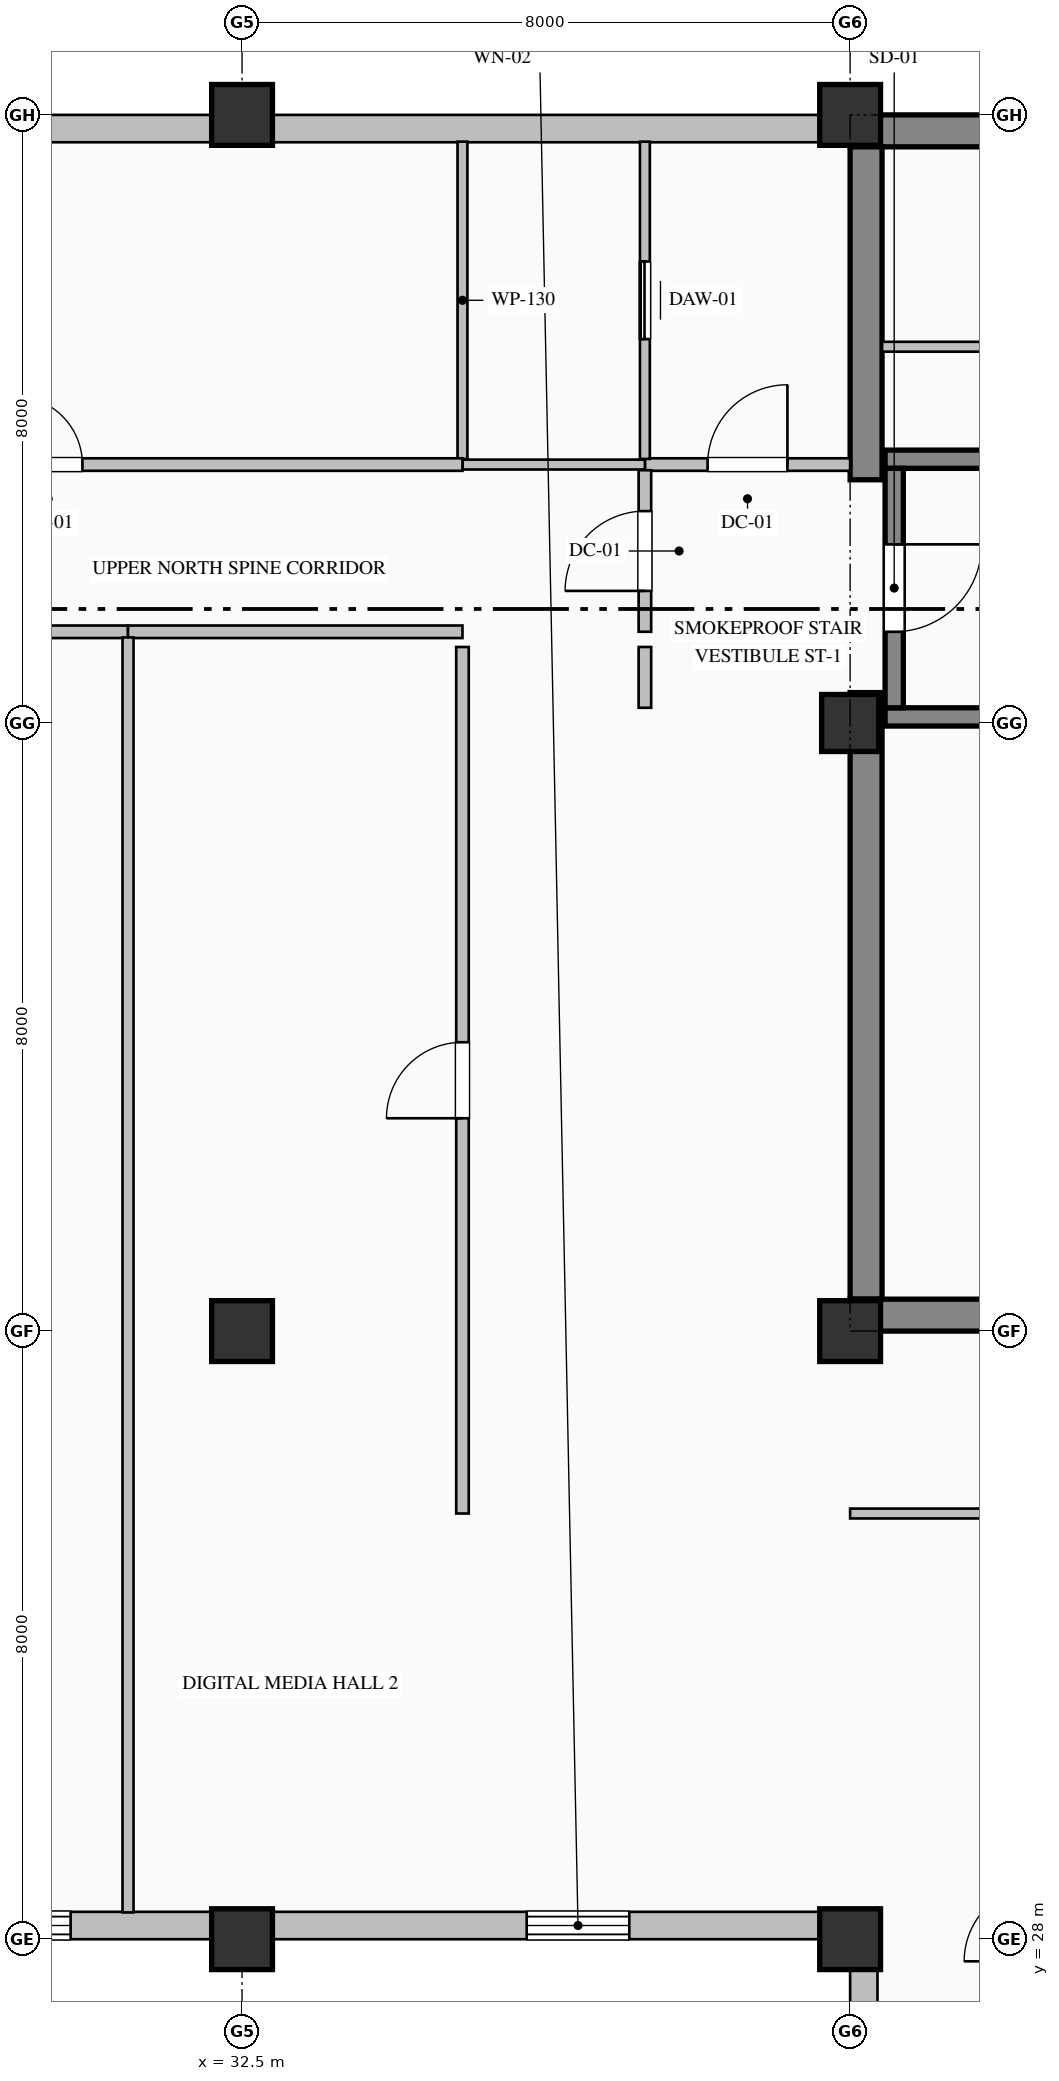
"""IFC4 building model, lengths in metres.
Left out: names, types, materials, properties, quantities, classifications, styles, units other than length and angle.
Written with IfcOpenShell. Run it as: python <this file> out.ifc"""

import sys

from ifc_helpers import new_model, si_unit, direction, frame, frame_2d, origin, origin_2d, place, context, subcontext, project, spatial, rectangle, hollow_rectangle, extrude, element, fill, save


model = new_model("IFC4")
c1 = context("Model", 3, precision=1e-05, world=origin(), true_north=direction((0.0, 1.0)))
c2 = subcontext(c1, "Body", "Model", "MODEL_VIEW")
j1 = project(units=[si_unit("LENGTHUNIT", "METRE"), si_unit("PLANEANGLEUNIT", "RADIAN")], contexts=[c1])
p1 = place(None, origin())
s1 = spatial("IfcSite", under=j1, at=p1, CompositionType="ELEMENT")
p2 = place(p1, origin())
s2 = spatial("IfcBuilding", under=s1, at=p2, CompositionType="ELEMENT")
p3 = place(p2, frame((0.0, 0.0, 315.2)))
s3 = spatial("IfcBuildingStorey", under=s2, at=p3, CompositionType="ELEMENT", Elevation=315.2)
p4 = place(p3, frame((40.5, 51.79, 0.0), z_axis=(0.0, 0.0, 1.0), x_axis=(1.0, 0.0, 0.0)))
e1 = element("IfcWall", 1, at=p4, inside=s3, PredefinedType="SHEAR", context=c2, shape_type="SweptSolid", body=[
    extrude(rectangle(XDim=23.5, YDim=0.42, at=frame_2d((11.75, 0.0))), origin(), (0.0, 0.0, 1.0), 3.785),
])
p5 = place(p3, frame((40.71, 36.42, 0.0), z_axis=(0.0, 0.0, 1.0), x_axis=(0.0, 1.0, 0.0)))
e2 = element("IfcWall", 2, at=p5, inside=s3, PredefinedType="SHEAR", context=c2, shape_type="SweptSolid", body=[
    extrude(rectangle(XDim=7.98, YDim=0.42, at=frame_2d((3.99, 0.0))), origin(), (0.0, 0.0, 1.0), 3.785),
])
p6 = place(p3, frame((40.71, 47.2, 0.0), z_axis=(0.0, 0.0, 1.0), x_axis=(0.0, 1.0, 0.0)))
e3 = element("IfcWall", 3, at=p6, inside=s3, PredefinedType="SHEAR", context=c2, shape_type="SweptSolid", body=[
    extrude(rectangle(XDim=4.38, YDim=0.42, at=frame_2d((2.19, 0.0))), origin(), (0.0, 0.0, 1.0), 3.785),
])
p7 = place(p3, frame((40.5, 36.21, 0.0), z_axis=(0.0, 0.0, 1.0), x_axis=(1.0, 0.0, 0.0)))
e4 = element("IfcWall", 4, at=p7, inside=s3, PredefinedType="SHEAR", context=c2, shape_type="SweptSolid", body=[
    extrude(rectangle(XDim=9.1, YDim=0.42, at=frame_2d((4.55, 0.0))), origin(), (0.0, 0.0, 1.0), 3.785),
])
for number, where, z_axis, x_axis in (
    (5, (32.5, 28.0, 0.0), (0.0, 0.0, 1.0), (1.0, 0.0, 0.0)),
    (6, (32.5, 36.0, 0.0), (0.0, 0.0, 1.0), (1.0, 0.0, 0.0)),
    (7, (32.5, 52.0, 0.0), (0.0, 0.0, 1.0), (1.0, 0.0, 0.0)),
    (8, (40.5, 28.0, 0.0), (0.0, 0.0, 1.0), (1.0, 0.0, 0.0)),
    (9, (40.5, 36.0, 0.0), (0.0, 0.0, 1.0), (1.0, 0.0, 0.0)),
):
    element("IfcColumn", number, at=place(p3, frame(where, z_axis=z_axis, x_axis=x_axis)), inside=s3, PredefinedType="COLUMN", context=c2, shape_type="SweptSolid", body=[
        extrude(hollow_rectangle(XDim=0.8, YDim=0.8, WallThickness=0.032, at=origin_2d()), origin(), (0.0, 0.0, 1.0), 4.0),
    ])
p8 = place(p3, frame((40.5, 44.0, 0.0), z_axis=(0.0, 0.0, 1.0), x_axis=(1.0, 0.0, 0.0)))
e10 = element("IfcColumn", 10, at=p8, inside=s3, PredefinedType="COLUMN", context=c2, shape_type="SweptSolid", body=[
    extrude(rectangle(XDim=0.75, YDim=0.75, at=origin_2d()), origin(), (0.0, 0.0, 1.0), 4.0),
])
p9 = place(p3, frame((40.5, 52.0, 0.0), z_axis=(0.0, 0.0, 1.0), x_axis=(1.0, 0.0, 0.0)))
e11 = element("IfcColumn", 11, at=p9, inside=s3, PredefinedType="COLUMN", context=c2, shape_type="SweptSolid", body=[
    extrude(hollow_rectangle(XDim=0.8, YDim=0.8, WallThickness=0.032, at=origin_2d()), origin(), (0.0, 0.0, 1.0), 4.0),
])
p10 = place(p3, frame((40.68, 22.5, 0.0), z_axis=(0.0, 0.0, 1.0), x_axis=(0.0, 1.0, 0.0)))
e12 = element("IfcWall", 12, at=p10, inside=s3, PredefinedType="SOLIDWALL", context=c2, shape_type="SweptSolid", body=[
    extrude(rectangle(XDim=5.86, YDim=0.36, at=frame_2d((2.93, 0.0))), origin(), (0.0, 0.0, 1.0), 3.185),
])
p11 = place(p3, frame((40.52, 28.18, 0.0), z_axis=(0.0, 0.0, 1.0), x_axis=(-1.0, 0.0, 0.0)))
e13 = element("IfcWall", 13, at=p11, inside=s3, PredefinedType="SOLIDWALL", context=c2, shape_type="SweptSolid", body=[
    extrude(rectangle(XDim=20.02, YDim=0.36, at=frame_2d((10.01, 0.0))), origin(), (0.0, 0.0, 1.0), 3.185),
])
p12 = place(p11, frame((2.925, 0.0, 0.9)))
e14 = element("IfcOpeningElement", 14, at=p12, cuts=e13, PredefinedType="OPENING", context=c2, shape_type="SweptSolid", body=[
    extrude(rectangle(XDim=1.35, YDim=1.85, at=frame_2d((0.675, 0.925))), frame((0.0, 0.19, 0.0), z_axis=(0.0, -1.0, 0.0), x_axis=(1.0, 0.0, 0.0)), (0.0, 0.0, 1.0), 0.38),
])
p13 = place(p11, frame((10.275, 0.0, 0.8)))
e15 = element("IfcOpeningElement", 15, at=p13, cuts=e13, PredefinedType="OPENING", context=c2, shape_type="SweptSolid", body=[
    extrude(rectangle(XDim=1.05, YDim=2.15, at=frame_2d((0.525, 1.075))), frame((0.0, 0.19, 0.0), z_axis=(0.0, -1.0, 0.0), x_axis=(1.0, 0.0, 0.0)), (0.0, 0.0, 1.0), 0.38),
])
p14 = place(p11, frame((13.725, 0.0, 0.9)))
e16 = element("IfcOpeningElement", 16, at=p14, cuts=e13, PredefinedType="OPENING", context=c2, shape_type="SweptSolid", body=[
    extrude(rectangle(XDim=1.35, YDim=1.85, at=frame_2d((0.675, 0.925))), frame((0.0, 0.19, 0.0), z_axis=(0.0, -1.0, 0.0), x_axis=(1.0, 0.0, 0.0)), (0.0, 0.0, 1.0), 0.38),
])
p15 = place(p3, frame((20.5, 51.82, 0.0), z_axis=(0.0, 0.0, 1.0), x_axis=(1.0, 0.0, 0.0)))
e17 = element("IfcWall", 17, at=p15, inside=s3, PredefinedType="SOLIDWALL", context=c2, shape_type="SweptSolid", body=[
    extrude(rectangle(XDim=20.02, YDim=0.36, at=frame_2d((10.01, 0.0))), origin(), (0.0, 0.0, 1.0), 3.335),
])
p16 = place(p15, frame((6.675, 0.0, 0.8)))
e18 = element("IfcOpeningElement", 18, at=p16, cuts=e17, PredefinedType="OPENING", context=c2, shape_type="SweptSolid", body=[
    extrude(rectangle(XDim=1.05, YDim=2.15, at=frame_2d((0.525, 1.075))), frame((0.0, 0.19, 0.0), z_axis=(0.0, -1.0, 0.0), x_axis=(1.0, 0.0, 0.0)), (0.0, 0.0, 1.0), 0.38),
])
for number, where, z_axis, x_axis in (
    (19, (40.96, 47.47, 0.0), (0.0, 0.0, 1.0), (1.0, 0.0, 0.0)),
    (20, (49.04, 44.08, 0.0), (0.0, 0.0, 1.0), (-1.0, 0.0, 0.0)),
):
    element("IfcWall", number, at=place(p3, frame(where, z_axis=z_axis, x_axis=x_axis)), inside=s3, PredefinedType="SOLIDWALL", context=c2, shape_type="SweptSolid", body=[
        extrude(rectangle(XDim=8.08, YDim=0.24, at=frame_2d((4.04, 0.0))), origin(), (0.0, 0.0, 1.0), 4.0),
    ])
p17 = place(p3, frame((41.08, 47.35, 0.0), z_axis=(0.0, 0.0, 1.0), x_axis=(0.0, -1.0, 0.0)))
e21 = element("IfcWall", 21, at=p17, inside=s3, PredefinedType="SOLIDWALL", context=c2, shape_type="SweptSolid", body=[
    extrude(rectangle(XDim=3.15, YDim=0.24, at=frame_2d((1.575, 0.0))), origin(), (0.0, 0.0, 1.0), 4.0),
])
p18 = place(p17, frame((1.0, 0.0, 0.0)))
e22 = element("IfcOpeningElement", 22, at=p18, cuts=e21, PredefinedType="OPENING", context=c2, shape_type="SweptSolid", body=[
    extrude(rectangle(XDim=1.15, YDim=2.2, at=frame_2d((0.575, 1.1))), frame((0.0, 0.13, 0.0), z_axis=(0.0, -1.0, 0.0), x_axis=(1.0, 0.0, 0.0)), (0.0, 0.0, 1.0), 0.26),
])
p19 = place(p3, frame((37.8, 47.4, 0.0), z_axis=(0.0, 0.0, 1.0), x_axis=(1.0, 0.0, 0.0)))
e23 = element("IfcWall", 23, at=p19, inside=s3, PredefinedType="PARTITIONING", context=c2, shape_type="SweptSolid", body=[
    extrude(rectangle(XDim=2.7, YDim=0.165, at=frame_2d((1.35, 0.0))), origin(), (0.0, 0.0, 1.0), 3.785),
])
p20 = place(p19, frame((0.825, 0.0, 0.0)))
e24 = element("IfcOpeningElement", 24, at=p20, cuts=e23, PredefinedType="OPENING", context=c2, shape_type="SweptSolid", body=[
    extrude(rectangle(XDim=1.05, YDim=2.15, at=frame_2d((0.525, 1.075))), frame((0.0, 0.093, 0.0), z_axis=(0.0, -1.0, 0.0), x_axis=(1.0, 0.0, 0.0)), (0.0, 0.0, 1.0), 0.185),
])
p21 = place(p3, frame((37.8, 45.2, 0.0), z_axis=(0.0, 0.0, 1.0), x_axis=(0.0, 1.0, 0.0)))
e25 = element("IfcWall", 25, at=p21, inside=s3, PredefinedType="PARTITIONING", context=c2, shape_type="SweptSolid", body=[
    extrude(rectangle(XDim=2.125, YDim=0.165, at=frame_2d((1.063, 0.0))), origin(), (0.0, 0.0, 1.0), 3.785),
])
p22 = place(p21, frame((0.538, 0.0, 0.0)))
e26 = element("IfcOpeningElement", 26, at=p22, cuts=e25, PredefinedType="OPENING", context=c2, shape_type="SweptSolid", body=[
    extrude(rectangle(XDim=1.05, YDim=2.15, at=frame_2d((0.525, 1.075))), frame((0.0, 0.093, 0.0), z_axis=(0.0, -1.0, 0.0), x_axis=(1.0, 0.0, 0.0)), (0.0, 0.0, 1.0), 0.185),
])
p23 = place(p3, frame((37.8, 44.2, 0.0), z_axis=(0.0, 0.0, 1.0), x_axis=(0.0, 1.0, 0.0)))
e27 = element("IfcWall", 27, at=p23, inside=s3, PredefinedType="PARTITIONING", context=c2, shape_type="SweptSolid", body=[
    extrude(rectangle(XDim=0.8, YDim=0.165, at=frame_2d((0.4, 0.0))), origin(), (0.0, 0.0, 1.0), 3.785),
])
p24 = place(p3, frame((37.8, 47.475, 0.0), z_axis=(0.0, 0.0, 1.0), x_axis=(0.0, 1.0, 0.0)))
e28 = element("IfcWall", 28, at=p24, inside=s3, PredefinedType="PARTITIONING", context=c2, shape_type="SweptSolid", body=[
    extrude(rectangle(XDim=4.173, YDim=0.13, at=frame_2d((2.087, 0.0))), origin(), (0.0, 0.0, 1.0), 3.785),
])
p25 = place(p24, frame((1.577, 0.0, 0.0)))
e29 = element("IfcOpeningElement", 29, at=p25, cuts=e28, PredefinedType="OPENING", context=c2, shape_type="SweptSolid", body=[
    extrude(rectangle(XDim=1.02, YDim=2.15, at=frame_2d((0.51, 1.075))), frame((0.0, 0.075, 0.0), z_axis=(0.0, -1.0, 0.0), x_axis=(1.0, 0.0, 0.0)), (0.0, 0.0, 1.0), 0.15),
])
p26 = place(p3, frame((37.8, 47.4, 0.0), z_axis=(0.0, 0.0, 1.0), x_axis=(-1.0, 0.0, 0.0)))
e30 = element("IfcWall", 30, at=p26, inside=s3, PredefinedType="PARTITIONING", context=c2, shape_type="SweptSolid", body=[
    extrude(rectangle(XDim=2.4, YDim=0.13, at=frame_2d((1.2, 0.0))), origin(), (0.0, 0.0, 1.0), 3.785),
])
p27 = place(p3, frame((35.4, 47.475, 0.0), z_axis=(0.0, 0.0, 1.0), x_axis=(0.0, 1.0, 0.0)))
e31 = element("IfcWall", 31, at=p27, inside=s3, PredefinedType="PARTITIONING", context=c2, shape_type="SweptSolid", body=[
    extrude(rectangle(XDim=4.173, YDim=0.13, at=frame_2d((2.087, 0.0))), origin(), (0.0, 0.0, 1.0), 3.785),
])
p28 = place(p3, frame((40.92, 48.95, 0.0), z_axis=(0.0, 0.0, 1.0), x_axis=(1.0, 0.0, 0.0)))
e32 = element("IfcWall", 32, at=p28, inside=s3, PredefinedType="PARTITIONING", context=c2, shape_type="SweptSolid", body=[
    extrude(rectangle(XDim=4.28, YDim=0.13, at=frame_2d((2.14, 0.0))), origin(), (0.0, 0.0, 1.0), 3.785),
])
p29 = place(p28, frame((1.68, 0.0, 0.0)))
e33 = element("IfcOpeningElement", 33, at=p29, cuts=e32, PredefinedType="OPENING", context=c2, shape_type="SweptSolid", body=[
    extrude(rectangle(XDim=0.92, YDim=2.15, at=frame_2d((0.46, 1.075))), frame((0.0, 0.075, 0.0), z_axis=(0.0, -1.0, 0.0), x_axis=(1.0, 0.0, 0.0)), (0.0, 0.0, 1.0), 0.15),
])
p30 = place(p3, frame((24.5, 47.4, 0.0), z_axis=(0.0, 0.0, 1.0), x_axis=(1.0, 0.0, 0.0)))
e34 = element("IfcWall", 34, at=p30, inside=s3, PredefinedType="PARTITIONING", context=c2, shape_type="SweptSolid", body=[
    extrude(rectangle(XDim=10.9, YDim=0.165, at=frame_2d((5.45, 0.0))), origin(), (0.0, 0.0, 1.0), 3.785),
])
p31 = place(p30, frame((5.0, 0.0, 0.0)))
e35 = element("IfcOpeningElement", 35, at=p31, cuts=e34, PredefinedType="OPENING", context=c2, shape_type="SweptSolid", body=[
    extrude(rectangle(XDim=0.9, YDim=2.15, at=frame_2d((0.45, 1.075))), frame((0.0, 0.093, 0.0), z_axis=(0.0, -1.0, 0.0), x_axis=(1.0, 0.0, 0.0)), (0.0, 0.0, 1.0), 0.185),
])
p32 = place(p3, frame((31.0, 45.2, 0.0), z_axis=(0.0, 0.0, 1.0), x_axis=(-1.0, 0.0, 0.0)))
e36 = element("IfcWall", 36, at=p32, inside=s3, PredefinedType="PARTITIONING", context=c2, shape_type="SweptSolid", body=[
    extrude(rectangle(XDim=6.5, YDim=0.165, at=frame_2d((3.25, 0.0))), origin(), (0.0, 0.0, 1.0), 3.785),
])
p33 = place(p32, frame((2.75, 0.0, 0.0)))
e37 = element("IfcOpeningElement", 37, at=p33, cuts=e36, PredefinedType="OPENING", context=c2, shape_type="SweptSolid", body=[
    extrude(rectangle(XDim=1.0, YDim=2.15, at=frame_2d((0.5, 1.075))), frame((0.0, 0.093, 0.0), z_axis=(0.0, -1.0, 0.0), x_axis=(1.0, 0.0, 0.0)), (0.0, 0.0, 1.0), 0.185),
])
p34 = place(p3, frame((35.4, 45.2, 0.0), z_axis=(0.0, 0.0, 1.0), x_axis=(-1.0, 0.0, 0.0)))
e38 = element("IfcWall", 38, at=p34, inside=s3, PredefinedType="PARTITIONING", context=c2, shape_type="SweptSolid", body=[
    extrude(rectangle(XDim=4.4, YDim=0.165, at=frame_2d((2.2, 0.0))), origin(), (0.0, 0.0, 1.0), 3.785),
])
p35 = place(p3, frame((35.4, 33.6, 0.0), z_axis=(0.0, 0.0, 1.0), x_axis=(0.0, 1.0, 0.0)))
e39 = element("IfcWall", 39, at=p35, inside=s3, PredefinedType="PARTITIONING", context=c2, shape_type="SweptSolid", body=[
    extrude(rectangle(XDim=11.4, YDim=0.165, at=frame_2d((5.7, 0.0))), origin(), (0.0, 0.0, 1.0), 3.785),
])
p36 = place(p35, frame((5.2, 0.0, 0.0)))
e40 = element("IfcOpeningElement", 40, at=p36, cuts=e39, PredefinedType="OPENING", context=c2, shape_type="SweptSolid", body=[
    extrude(rectangle(XDim=1.0, YDim=2.15, at=frame_2d((0.5, 1.075))), frame((0.0, 0.093, 0.0), z_axis=(0.0, -1.0, 0.0), x_axis=(1.0, 0.0, 0.0)), (0.0, 0.0, 1.0), 0.185),
])
p37 = place(p3, frame((43.0, 33.6, 0.0), z_axis=(0.0, 0.0, 1.0), x_axis=(-1.0, 0.0, 0.0)))
e41 = element("IfcWall", 41, at=p37, inside=s3, PredefinedType="PARTITIONING", context=c2, shape_type="SweptSolid", body=[
    extrude(rectangle(XDim=2.5, YDim=0.13, at=frame_2d((1.25, 0.0))), origin(), (0.0, 0.0, 1.0), 3.785),
])
p38 = place(p3, frame((31.0, 45.125, 0.0), z_axis=(0.0, 0.0, 1.0), x_axis=(0.0, -1.0, 0.0)))
e42 = element("IfcWall", 42, at=p38, inside=s3, PredefinedType="PARTITIONING", context=c2, shape_type="SweptSolid", body=[
    extrude(rectangle(XDim=16.773, YDim=0.145, at=frame_2d((8.387, 0.0))), origin(), (0.0, 0.0, 1.0), 3.785),
])
p39 = place(p12, origin())
e43 = element("IfcWindow", 43, at=p39, inside=s3, PartitioningType="DOUBLE_PANEL_VERTICAL", PredefinedType="WINDOW", context=c2, shape_type="SweptSolid", body=[
    extrude(rectangle(XDim=1.35, YDim=1.85, at=frame_2d((0.675, 0.925))), frame((0.0, 0.15, 0.0), z_axis=(0.0, -1.0, 0.0), x_axis=(1.0, 0.0, 0.0)), (0.0, 0.0, 1.0), 0.06),
])
fill(e14, e43)
p40 = place(p13, origin())
e44 = element("IfcWindow", 44, at=p40, inside=s3, PartitioningType="SINGLE_PANEL", PredefinedType="WINDOW", context=c2, shape_type="SweptSolid", body=[
    extrude(rectangle(XDim=1.05, YDim=2.15, at=frame_2d((0.525, 1.075))), frame((0.0, 0.15, 0.0), z_axis=(0.0, -1.0, 0.0), x_axis=(1.0, 0.0, 0.0)), (0.0, 0.0, 1.0), 0.06),
])
fill(e15, e44)
p41 = place(p18, origin())
e45 = element("IfcDoor", 45, at=p41, inside=s3, OperationType="SINGLE_SWING_LEFT", PredefinedType="DOOR", context=c2, shape_type="SweptSolid", body=[
    extrude(rectangle(XDim=1.15, YDim=2.2, at=frame_2d((0.575, 1.1))), frame((0.0, 0.025, 0.0), z_axis=(0.0, -1.0, 0.0), x_axis=(1.0, 0.0, 0.0)), (0.0, 0.0, 1.0), 0.05),
])
fill(e22, e45)
p42 = place(p20, origin())
e46 = element("IfcDoor", 46, at=p42, inside=s3, OperationType="SINGLE_SWING_RIGHT", PredefinedType="DOOR", context=c2, shape_type="SweptSolid", body=[
    extrude(rectangle(XDim=1.05, YDim=2.15, at=frame_2d((0.525, 1.075))), frame((0.0, 0.025, 0.0), z_axis=(0.0, -1.0, 0.0), x_axis=(1.0, 0.0, 0.0)), (0.0, 0.0, 1.0), 0.05),
])
fill(e24, e46)
p43 = place(p22, origin())
e47 = element("IfcDoor", 47, at=p43, inside=s3, OperationType="SINGLE_SWING_LEFT", PredefinedType="DOOR", context=c2, shape_type="SweptSolid", body=[
    extrude(rectangle(XDim=1.05, YDim=2.15, at=frame_2d((0.525, 1.075))), frame((0.0, 0.025, 0.0), z_axis=(0.0, -1.0, 0.0), x_axis=(1.0, 0.0, 0.0)), (0.0, 0.0, 1.0), 0.05),
])
fill(e26, e47)
p44 = place(p25, origin())
e48 = element("IfcDoor", 48, at=p44, inside=s3, OperationType="SLIDING_TO_LEFT", PredefinedType="DOOR", context=c2, shape_type="SweptSolid", body=[
    extrude(rectangle(XDim=1.02, YDim=2.15, at=frame_2d((0.51, 1.075))), frame((0.0, 0.025, 0.0), z_axis=(0.0, -1.0, 0.0), x_axis=(1.0, 0.0, 0.0)), (0.0, 0.0, 1.0), 0.05),
])
fill(e29, e48)
p45 = place(p31, origin())
e49 = element("IfcDoor", 49, at=p45, inside=s3, OperationType="SINGLE_SWING_LEFT", PredefinedType="DOOR", context=c2, shape_type="SweptSolid", body=[
    extrude(rectangle(XDim=0.9, YDim=2.15, at=frame_2d((0.45, 1.075))), frame((0.0, 0.025, 0.0), z_axis=(0.0, -1.0, 0.0), x_axis=(1.0, 0.0, 0.0)), (0.0, 0.0, 1.0), 0.05),
])
fill(e35, e49)
p46 = place(p36, origin())
e50 = element("IfcDoor", 50, at=p46, inside=s3, OperationType="SINGLE_SWING_LEFT", PredefinedType="DOOR", context=c2, shape_type="SweptSolid", body=[
    extrude(rectangle(XDim=1.0, YDim=2.15, at=frame_2d((0.5, 1.075))), frame((0.0, 0.025, 0.0), z_axis=(0.0, -1.0, 0.0), x_axis=(1.0, 0.0, 0.0)), (0.0, 0.0, 1.0), 0.05),
])
fill(e40, e50)
save(model, sys.argv[1])
